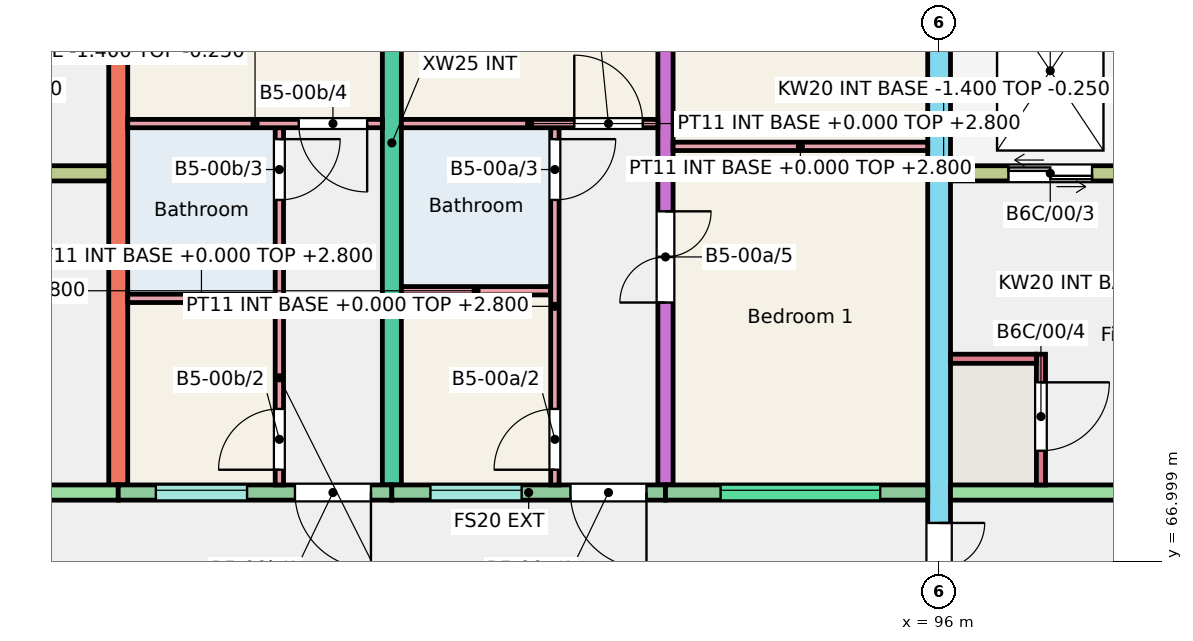
"""IFC4 building model, lengths in metres.
Left out: names, types, materials, properties, quantities, classifications, styles, units other than length and angle.
Written with IfcOpenShell. Run it as: python <this file> out.ifc"""

import sys

from ifc_helpers import new_model, si_unit, direction, frame, frame_2d, origin, place, context, subcontext, project, spatial, rectangle, extrude, element, fill, save


model = new_model("IFC4")
c1 = context("Model", 3, precision=1e-05, world=origin(), true_north=direction((0.0, 1.0)))
c2 = subcontext(c1, "Body", "Model", "MODEL_VIEW")
j1 = project(units=[si_unit("LENGTHUNIT", "METRE"), si_unit("PLANEANGLEUNIT", "RADIAN")], contexts=[c1])
p1 = place(None, origin())
s1 = spatial("IfcSite", under=j1, at=p1, CompositionType="ELEMENT")
p2 = place(p1, origin())
s2 = spatial("IfcBuilding", under=s1, at=p2, CompositionType="ELEMENT")
p3 = place(p2, origin())
s3 = spatial("IfcBuildingStorey", under=s2, at=p3, CompositionType="ELEMENT", Elevation=0.0)
for number, where, z_axis, x_axis in (
    (1, (85.2, 68.0, -0.25), (0.0, 0.0, 1.0), (0.0, 1.0, 0.0)),
    (2, (88.8, 68.0, -0.25), (0.0, 0.0, 1.0), (0.0, 1.0, 0.0)),
):
    element("IfcWall", number, at=place(p3, frame(where, z_axis=z_axis, x_axis=x_axis)), inside=s3, PredefinedType="SHEAR", context=c2, shape_type="SweptSolid", body=[
        extrude(rectangle(XDim=9.0, YDim=0.25, at=frame_2d((4.5, 0.0))), origin(), (0.0, 0.0, 1.0), 3.25),
    ])
p4 = place(p3, frame((92.4, 68.0, -0.25), z_axis=(0.0, 0.0, 1.0), x_axis=(0.0, 1.0, 0.0)))
e3 = element("IfcWall", 3, at=p4, inside=s3, PredefinedType="SHEAR", context=c2, shape_type="SweptSolid", body=[
    extrude(rectangle(XDim=9.0, YDim=0.2, at=frame_2d((4.5, 0.0))), origin(), (0.0, 0.0, 1.0), 3.25),
])
p5 = place(p4, frame((2.4, 0.0, 0.25)))
e4 = element("IfcOpeningElement", 4, at=p5, cuts=e3, PredefinedType="OPENING", context=c2, shape_type="SweptSolid", body=[
    extrude(rectangle(XDim=1.2, YDim=2.1, at=frame_2d((0.6, 1.05))), frame((0.0, 0.11, 0.0), z_axis=(0.0, -1.0, 0.0), x_axis=(1.0, 0.0, 0.0)), (0.0, 0.0, 1.0), 0.22),
])
p6 = place(p4, frame((6.4, 0.0, 0.25)))
e5 = element("IfcOpeningElement", 5, at=p6, cuts=e3, PredefinedType="OPENING", context=c2, shape_type="SweptSolid", body=[
    extrude(rectangle(XDim=1.2, YDim=2.1, at=frame_2d((0.6, 1.05))), frame((0.0, 0.11, 0.0), z_axis=(0.0, -1.0, 0.0), x_axis=(1.0, 0.0, 0.0)), (0.0, 0.0, 1.0), 0.22),
])
p7 = place(p3, frame((96.0, 66.0, -0.25), z_axis=(0.0, 0.0, 1.0), x_axis=(0.0, 1.0, 0.0)))
e6 = element("IfcWall", 6, at=p7, inside=s3, PredefinedType="SHEAR", context=c2, shape_type="SweptSolid", body=[
    extrude(rectangle(XDim=11.0, YDim=0.3, at=frame_2d((5.5, 0.0))), origin(), (0.0, 0.0, 1.0), 3.25),
])
p8 = place(p7, frame((0.3, 0.0, 0.25)))
e7 = element("IfcOpeningElement", 7, at=p8, cuts=e6, PredefinedType="OPENING", context=c2, shape_type="SweptSolid", body=[
    extrude(rectangle(XDim=1.2, YDim=2.1, at=frame_2d((0.6, 1.05))), frame((0.0, 0.16, 0.0), z_axis=(0.0, -1.0, 0.0), x_axis=(1.0, 0.0, 0.0)), (0.0, 0.0, 1.0), 0.32),
])
p9 = place(p3, frame((79.35, 67.9, -0.25), z_axis=(0.0, 0.0, 1.0), x_axis=(1.0, 0.0, 0.0)))
e8 = element("IfcWall", 8, at=p9, inside=s3, PredefinedType="SHEAR", context=c2, shape_type="SweptSolid", body=[
    extrude(rectangle(XDim=5.85, YDim=0.2, at=frame_2d((2.925, 0.0))), origin(), (0.0, 0.0, 1.0), 3.25),
])
p10 = place(p9, frame((2.312, 0.0, 0.25)))
e9 = element("IfcOpeningElement", 9, at=p10, cuts=e8, PredefinedType="OPENING", context=c2, shape_type="SweptSolid", body=[
    extrude(rectangle(XDim=1.1, YDim=2.1, at=frame_2d((0.55, 1.05))), frame((0.0, 0.11, 0.0), z_axis=(0.0, -1.0, 0.0), x_axis=(1.0, 0.0, 0.0)), (0.0, 0.0, 1.0), 0.22),
])
p11 = place(p3, frame((79.35, 72.1, -0.25), z_axis=(0.0, 0.0, 1.0), x_axis=(1.0, 0.0, 0.0)))
e10 = element("IfcWall", 10, at=p11, inside=s3, PredefinedType="SHEAR", context=c2, shape_type="SweptSolid", body=[
    extrude(rectangle(XDim=5.725, YDim=0.2, at=frame_2d((2.862, 0.0))), origin(), (0.0, 0.0, 1.0), 3.25),
])
p12 = place(p11, frame((3.775, 0.0, 0.25)))
e11 = element("IfcOpeningElement", 11, at=p12, cuts=e10, PredefinedType="OPENING", context=c2, shape_type="SweptSolid", body=[
    extrude(rectangle(XDim=1.0, YDim=2.1, at=frame_2d((0.5, 1.05))), frame((0.0, 0.11, 0.0), z_axis=(0.0, -1.0, 0.0), x_axis=(1.0, 0.0, 0.0)), (0.0, 0.0, 1.0), 0.22),
])
p13 = place(p11, frame((0.762, 0.0, 0.25)))
e12 = element("IfcOpeningElement", 12, at=p13, cuts=e10, PredefinedType="OPENING", context=c2, shape_type="SweptSolid", body=[
    extrude(rectangle(XDim=1.1, YDim=2.1, at=frame_2d((0.55, 1.05))), frame((0.0, 0.11, 0.0), z_axis=(0.0, -1.0, 0.0), x_axis=(1.0, 0.0, 0.0)), (0.0, 0.0, 1.0), 0.22),
])
p14 = place(p3, frame((85.2, 67.9, -0.25), z_axis=(0.0, 0.0, 1.0), x_axis=(1.0, 0.0, 0.0)))
e13 = element("IfcWall", 13, at=p14, inside=s3, PredefinedType="SOLIDWALL", context=c2, shape_type="SweptSolid", body=[
    extrude(rectangle(XDim=3.6, YDim=0.2, at=frame_2d((1.8, 0.0))), origin(), (0.0, 0.0, 1.0), 3.25),
])
p15 = place(p14, frame((0.495, 0.0, 1.35)))
e14 = element("IfcOpeningElement", 14, at=p15, cuts=e13, PredefinedType="OPENING", context=c2, shape_type="SweptSolid", body=[
    extrude(rectangle(XDim=1.2, YDim=1.3, at=frame_2d((0.6, 0.65))), frame((0.0, 0.11, 0.0), z_axis=(0.0, -1.0, 0.0), x_axis=(1.0, 0.0, 0.0)), (0.0, 0.0, 1.0), 0.22),
])
p16 = place(p14, frame((2.325, 0.0, 0.25)))
e15 = element("IfcOpeningElement", 15, at=p16, cuts=e13, PredefinedType="OPENING", context=c2, shape_type="SweptSolid", body=[
    extrude(rectangle(XDim=1.0, YDim=2.1, at=frame_2d((0.5, 1.05))), frame((0.0, 0.11, 0.0), z_axis=(0.0, -1.0, 0.0), x_axis=(1.0, 0.0, 0.0)), (0.0, 0.0, 1.0), 0.22),
])
p17 = place(p3, frame((88.8, 67.9, -0.25), z_axis=(0.0, 0.0, 1.0), x_axis=(1.0, 0.0, 0.0)))
e16 = element("IfcWall", 16, at=p17, inside=s3, PredefinedType="SOLIDWALL", context=c2, shape_type="SweptSolid", body=[
    extrude(rectangle(XDim=3.6, YDim=0.2, at=frame_2d((1.8, 0.0))), origin(), (0.0, 0.0, 1.0), 3.25),
])
p18 = place(p17, frame((0.508, 0.0, 1.35)))
e17 = element("IfcOpeningElement", 17, at=p18, cuts=e16, PredefinedType="OPENING", context=c2, shape_type="SweptSolid", body=[
    extrude(rectangle(XDim=1.2, YDim=1.3, at=frame_2d((0.6, 0.65))), frame((0.0, 0.11, 0.0), z_axis=(0.0, -1.0, 0.0), x_axis=(1.0, 0.0, 0.0)), (0.0, 0.0, 1.0), 0.22),
])
p19 = place(p17, frame((2.35, 0.0, 0.25)))
e18 = element("IfcOpeningElement", 18, at=p19, cuts=e16, PredefinedType="OPENING", context=c2, shape_type="SweptSolid", body=[
    extrude(rectangle(XDim=1.0, YDim=2.1, at=frame_2d((0.5, 1.05))), frame((0.0, 0.11, 0.0), z_axis=(0.0, -1.0, 0.0), x_axis=(1.0, 0.0, 0.0)), (0.0, 0.0, 1.0), 0.22),
])
p20 = place(p3, frame((92.4, 67.9, -0.25), z_axis=(0.0, 0.0, 1.0), x_axis=(1.0, 0.0, 0.0)))
e19 = element("IfcWall", 19, at=p20, inside=s3, PredefinedType="SOLIDWALL", context=c2, shape_type="SweptSolid", body=[
    extrude(rectangle(XDim=3.45, YDim=0.2, at=frame_2d((1.725, 0.0))), origin(), (0.0, 0.0, 1.0), 3.25),
])
p21 = place(p20, frame((0.725, 0.0, 1.45)))
e20 = element("IfcOpeningElement", 20, at=p21, cuts=e19, PredefinedType="OPENING", context=c2, shape_type="SweptSolid", body=[
    extrude(rectangle(XDim=2.1, YDim=1.2, at=frame_2d((1.05, 0.6))), frame((0.0, 0.11, 0.0), z_axis=(0.0, -1.0, 0.0), x_axis=(1.0, 0.0, 0.0)), (0.0, 0.0, 1.0), 0.22),
])
p22 = place(p3, frame((96.15, 67.9, -0.25), z_axis=(0.0, 0.0, 1.0), x_axis=(1.0, 0.0, 0.0)))
e21 = element("IfcWall", 21, at=p22, inside=s3, PredefinedType="SHEAR", context=c2, shape_type="SweptSolid", body=[
    extrude(rectangle(XDim=5.85, YDim=0.2, at=frame_2d((2.925, 0.0))), origin(), (0.0, 0.0, 1.0), 3.25),
])
p23 = place(p22, frame((2.312, 0.0, 0.25)))
e22 = element("IfcOpeningElement", 22, at=p23, cuts=e21, PredefinedType="OPENING", context=c2, shape_type="SweptSolid", body=[
    extrude(rectangle(XDim=1.1, YDim=2.1, at=frame_2d((0.55, 1.05))), frame((0.0, 0.11, 0.0), z_axis=(0.0, -1.0, 0.0), x_axis=(1.0, 0.0, 0.0)), (0.0, 0.0, 1.0), 0.22),
])
p24 = place(p3, frame((96.15, 72.1, -0.25), z_axis=(0.0, 0.0, 1.0), x_axis=(1.0, 0.0, 0.0)))
e23 = element("IfcWall", 23, at=p24, inside=s3, PredefinedType="SHEAR", context=c2, shape_type="SweptSolid", body=[
    extrude(rectangle(XDim=5.725, YDim=0.2, at=frame_2d((2.863, 0.0))), origin(), (0.0, 0.0, 1.0), 3.25),
])
p25 = place(p24, frame((3.775, 0.0, 0.25)))
e24 = element("IfcOpeningElement", 24, at=p25, cuts=e23, PredefinedType="OPENING", context=c2, shape_type="SweptSolid", body=[
    extrude(rectangle(XDim=1.0, YDim=2.1, at=frame_2d((0.5, 1.05))), frame((0.0, 0.11, 0.0), z_axis=(0.0, -1.0, 0.0), x_axis=(1.0, 0.0, 0.0)), (0.0, 0.0, 1.0), 0.22),
])
p26 = place(p24, frame((0.762, 0.0, 0.25)))
e25 = element("IfcOpeningElement", 25, at=p26, cuts=e23, PredefinedType="OPENING", context=c2, shape_type="SweptSolid", body=[
    extrude(rectangle(XDim=1.1, YDim=2.1, at=frame_2d((0.55, 1.05))), frame((0.0, 0.11, 0.0), z_axis=(0.0, -1.0, 0.0), x_axis=(1.0, 0.0, 0.0)), (0.0, 0.0, 1.0), 0.22),
])
p27 = place(p3, frame((97.34, 68.0, -0.25), z_axis=(0.0, 0.0, 1.0), x_axis=(0.0, 1.0, 0.0)))
e26 = element("IfcWall", 26, at=p27, inside=s3, PredefinedType="SHEAR", context=c2, shape_type="SweptSolid", body=[
    extrude(rectangle(XDim=1.72, YDim=0.12, at=frame_2d((0.86, 0.0))), origin(), (0.0, 0.0, 1.0), 3.25),
])
p28 = place(p27, frame((0.45, 0.0, 0.25)))
e27 = element("IfcOpeningElement", 27, at=p28, cuts=e26, PredefinedType="OPENING", context=c2, shape_type="SweptSolid", body=[
    extrude(rectangle(XDim=0.9, YDim=2.1, at=frame_2d((0.45, 1.05))), frame((0.0, 0.07, 0.0), z_axis=(0.0, -1.0, 0.0), x_axis=(1.0, 0.0, 0.0)), (0.0, 0.0, 1.0), 0.14),
])
p29 = place(p3, frame((96.15, 69.66, -0.25), z_axis=(0.0, 0.0, 1.0), x_axis=(1.0, 0.0, 0.0)))
e28 = element("IfcWall", 28, at=p29, inside=s3, PredefinedType="SHEAR", context=c2, shape_type="SweptSolid", body=[
    extrude(rectangle(XDim=1.13, YDim=0.12, at=frame_2d((0.565, 0.0))), origin(), (0.0, 0.0, 1.0), 3.25),
])
p30 = place(p3, frame((96.0, 72.1, -1.4), z_axis=(0.0, 0.0, 1.0), x_axis=(1.0, 0.0, 0.0)))
e29 = element("IfcWall", 29, at=p30, inside=s3, PredefinedType="SHEAR", context=c2, shape_type="SweptSolid", body=[
    extrude(rectangle(XDim=2.975, YDim=0.2, at=frame_2d((1.488, 0.0))), origin(), (0.0, 0.0, 1.0), 1.15),
])
p31 = place(p3, frame((96.075, 72.2, -1.4), z_axis=(0.0, 0.0, 1.0), x_axis=(0.0, 1.0, 0.0)))
e30 = element("IfcWall", 30, at=p31, inside=s3, PredefinedType="SHEAR", context=c2, shape_type="SweptSolid", body=[
    extrude(rectangle(XDim=3.0, YDim=0.15, at=frame_2d((1.5, 0.0))), origin(), (0.0, 0.0, 1.0), 1.15),
])
p32 = place(p3, frame((88.925, 70.555, 0.0), z_axis=(0.0, 0.0, 1.0), x_axis=(1.0, 0.0, 0.0)))
e31 = element("IfcWall", 31, at=p32, inside=s3, PredefinedType="PARTITIONING", context=c2, shape_type="SweptSolid", body=[
    extrude(rectangle(XDim=1.965, YDim=0.11, at=frame_2d((0.982, 0.0))), origin(), (0.0, 0.0, 1.0), 2.8),
])
p33 = place(p3, frame((90.945, 68.0, 0.0), z_axis=(0.0, 0.0, 1.0), x_axis=(0.0, 1.0, 0.0)))
e32 = element("IfcWall", 32, at=p33, inside=s3, PredefinedType="PARTITIONING", context=c2, shape_type="SweptSolid", body=[
    extrude(rectangle(XDim=4.7, YDim=0.11, at=frame_2d((2.35, 0.0))), origin(), (0.0, 0.0, 1.0), 2.8),
])
p34 = place(p33, frame((0.2, 0.0, 0.0)))
e33 = element("IfcOpeningElement", 33, at=p34, cuts=e32, PredefinedType="OPENING", context=c2, shape_type="SweptSolid", body=[
    extrude(rectangle(XDim=0.8, YDim=2.1, at=frame_2d((0.4, 1.05))), frame((0.0, 0.065, 0.0), z_axis=(0.0, -1.0, 0.0), x_axis=(1.0, 0.0, 0.0)), (0.0, 0.0, 1.0), 0.13),
])
p35 = place(p33, frame((3.75, 0.0, 0.0)))
e34 = element("IfcOpeningElement", 34, at=p35, cuts=e32, PredefinedType="OPENING", context=c2, shape_type="SweptSolid", body=[
    extrude(rectangle(XDim=0.8, YDim=2.1, at=frame_2d((0.4, 1.05))), frame((0.0, 0.065, 0.0), z_axis=(0.0, -1.0, 0.0), x_axis=(1.0, 0.0, 0.0)), (0.0, 0.0, 1.0), 0.13),
])
p36 = place(p3, frame((88.925, 72.755, 0.0), z_axis=(0.0, 0.0, 1.0), x_axis=(1.0, 0.0, 0.0)))
e35 = element("IfcWall", 35, at=p36, inside=s3, PredefinedType="PARTITIONING", context=c2, shape_type="SweptSolid", body=[
    extrude(rectangle(XDim=3.375, YDim=0.11, at=frame_2d((1.688, 0.0))), origin(), (0.0, 0.0, 1.0), 2.8),
])
p37 = place(p36, frame((2.275, 0.0, 0.0)))
e36 = element("IfcOpeningElement", 36, at=p37, cuts=e35, PredefinedType="OPENING", context=c2, shape_type="SweptSolid", body=[
    extrude(rectangle(XDim=0.9, YDim=2.1, at=frame_2d((0.45, 1.05))), frame((0.0, 0.065, 0.0), z_axis=(0.0, -1.0, 0.0), x_axis=(1.0, 0.0, 0.0)), (0.0, 0.0, 1.0), 0.13),
])
p38 = place(p3, frame((92.5, 72.455, 0.0), z_axis=(0.0, 0.0, 1.0), x_axis=(1.0, 0.0, 0.0)))
e37 = element("IfcWall", 37, at=p38, inside=s3, PredefinedType="PARTITIONING", context=c2, shape_type="SweptSolid", body=[
    extrude(rectangle(XDim=3.35, YDim=0.11, at=frame_2d((1.675, 0.0))), origin(), (0.0, 0.0, 1.0), 2.8),
])
p39 = place(p3, frame((85.325, 70.455, 0.0), z_axis=(0.0, 0.0, 1.0), x_axis=(1.0, 0.0, 0.0)))
e38 = element("IfcWall", 38, at=p39, inside=s3, PredefinedType="PARTITIONING", context=c2, shape_type="SweptSolid", body=[
    extrude(rectangle(XDim=1.94, YDim=0.11, at=frame_2d((0.97, 0.0))), origin(), (0.0, 0.0, 1.0), 2.8),
])
p40 = place(p3, frame((87.32, 68.0, 0.0), z_axis=(0.0, 0.0, 1.0), x_axis=(0.0, 1.0, 0.0)))
e39 = element("IfcWall", 39, at=p40, inside=s3, PredefinedType="PARTITIONING", context=c2, shape_type="SweptSolid", body=[
    extrude(rectangle(XDim=4.7, YDim=0.11, at=frame_2d((2.35, 0.0))), origin(), (0.0, 0.0, 1.0), 2.8),
])
p41 = place(p40, frame((0.2, 0.0, 0.0)))
e40 = element("IfcOpeningElement", 40, at=p41, cuts=e39, PredefinedType="OPENING", context=c2, shape_type="SweptSolid", body=[
    extrude(rectangle(XDim=0.8, YDim=2.1, at=frame_2d((0.4, 1.05))), frame((0.0, 0.065, 0.0), z_axis=(0.0, -1.0, 0.0), x_axis=(1.0, 0.0, 0.0)), (0.0, 0.0, 1.0), 0.13),
])
p42 = place(p40, frame((3.75, 0.0, 0.0)))
e41 = element("IfcOpeningElement", 41, at=p42, cuts=e39, PredefinedType="OPENING", context=c2, shape_type="SweptSolid", body=[
    extrude(rectangle(XDim=0.8, YDim=2.1, at=frame_2d((0.4, 1.05))), frame((0.0, 0.065, 0.0), z_axis=(0.0, -1.0, 0.0), x_axis=(1.0, 0.0, 0.0)), (0.0, 0.0, 1.0), 0.13),
])
p43 = place(p3, frame((85.325, 72.755, 0.0), z_axis=(0.0, 0.0, 1.0), x_axis=(1.0, 0.0, 0.0)))
e42 = element("IfcWall", 42, at=p43, inside=s3, PredefinedType="PARTITIONING", context=c2, shape_type="SweptSolid", body=[
    extrude(rectangle(XDim=3.35, YDim=0.11, at=frame_2d((1.675, 0.0))), origin(), (0.0, 0.0, 1.0), 2.8),
])
p44 = place(p43, frame((2.25, 0.0, 0.0)))
e43 = element("IfcOpeningElement", 43, at=p44, cuts=e42, PredefinedType="OPENING", context=c2, shape_type="SweptSolid", body=[
    extrude(rectangle(XDim=0.9, YDim=2.1, at=frame_2d((0.45, 1.05))), frame((0.0, 0.065, 0.0), z_axis=(0.0, -1.0, 0.0), x_axis=(1.0, 0.0, 0.0)), (0.0, 0.0, 1.0), 0.13),
])
p45 = place(p21, origin())
e44 = element("IfcWindow", 44, at=p45, inside=s3, PartitioningType="SINGLE_PANEL", PredefinedType="WINDOW", context=c2, shape_type="SweptSolid", body=[
    extrude(rectangle(XDim=2.1, YDim=1.2, at=frame_2d((1.05, 0.6))), frame((0.0, 0.06, 0.0), z_axis=(0.0, -1.0, 0.0), x_axis=(1.0, 0.0, 0.0)), (0.0, 0.0, 1.0), 0.06),
])
fill(e20, e44)
p46 = place(p18, origin())
e45 = element("IfcWindow", 45, at=p46, inside=s3, PartitioningType="SINGLE_PANEL", PredefinedType="WINDOW", context=c2, shape_type="SweptSolid", body=[
    extrude(rectangle(XDim=1.2, YDim=1.3, at=frame_2d((0.6, 0.65))), frame((0.0, 0.06, 0.0), z_axis=(0.0, -1.0, 0.0), x_axis=(1.0, 0.0, 0.0)), (0.0, 0.0, 1.0), 0.06),
])
fill(e17, e45)
p47 = place(p15, origin())
e46 = element("IfcWindow", 46, at=p47, inside=s3, PartitioningType="SINGLE_PANEL", PredefinedType="WINDOW", context=c2, shape_type="SweptSolid", body=[
    extrude(rectangle(XDim=1.2, YDim=1.3, at=frame_2d((0.6, 0.65))), frame((0.0, 0.06, 0.0), z_axis=(0.0, -1.0, 0.0), x_axis=(1.0, 0.0, 0.0)), (0.0, 0.0, 1.0), 0.06),
])
fill(e14, e46)
p48 = place(p19, origin())
e47 = element("IfcDoor", 47, at=p48, inside=s3, OperationType="SINGLE_SWING_RIGHT", PredefinedType="DOOR", context=c2, shape_type="SweptSolid", body=[
    extrude(rectangle(XDim=1.0, YDim=2.1, at=frame_2d((0.5, 1.05))), frame((0.0, 0.025, 0.0), z_axis=(0.0, -1.0, 0.0), x_axis=(1.0, 0.0, 0.0)), (0.0, 0.0, 1.0), 0.05),
])
fill(e18, e47)
p49 = place(p34, origin())
e48 = element("IfcDoor", 48, at=p49, inside=s3, OperationType="SINGLE_SWING_LEFT", PredefinedType="DOOR", context=c2, shape_type="SweptSolid", body=[
    extrude(rectangle(XDim=0.8, YDim=2.1, at=frame_2d((0.4, 1.05))), frame((0.0, 0.025, 0.0), z_axis=(0.0, -1.0, 0.0), x_axis=(1.0, 0.0, 0.0)), (0.0, 0.0, 1.0), 0.05),
])
fill(e33, e48)
p50 = place(p35, origin())
e49 = element("IfcDoor", 49, at=p50, inside=s3, OperationType="SINGLE_SWING_RIGHT", PredefinedType="DOOR", context=c2, shape_type="SweptSolid", body=[
    extrude(rectangle(XDim=0.8, YDim=2.1, at=frame_2d((0.4, 1.05))), frame((0.0, 0.025, 0.0), z_axis=(0.0, -1.0, 0.0), x_axis=(1.0, 0.0, 0.0)), (0.0, 0.0, 1.0), 0.05),
])
fill(e34, e49)
p51 = place(p37, origin())
e50 = element("IfcDoor", 50, at=p51, inside=s3, OperationType="SINGLE_SWING_LEFT", PredefinedType="DOOR", context=c2, shape_type="SweptSolid", body=[
    extrude(rectangle(XDim=0.9, YDim=2.1, at=frame_2d((0.45, 1.05))), frame((0.0, 0.025, 0.0), z_axis=(0.0, -1.0, 0.0), x_axis=(1.0, 0.0, 0.0)), (0.0, 0.0, 1.0), 0.05),
])
fill(e36, e50)
p52 = place(p5, origin())
e51 = element("IfcDoor", 51, at=p52, inside=s3, OperationType="DOUBLE_DOOR_SINGLE_SWING", PredefinedType="DOOR", context=c2, shape_type="SweptSolid", body=[
    extrude(rectangle(XDim=1.2, YDim=2.1, at=frame_2d((0.6, 1.05))), frame((0.0, 0.025, 0.0), z_axis=(0.0, -1.0, 0.0), x_axis=(1.0, 0.0, 0.0)), (0.0, 0.0, 1.0), 0.05),
])
fill(e4, e51)
p53 = place(p16, origin())
e52 = element("IfcDoor", 52, at=p53, inside=s3, OperationType="SINGLE_SWING_RIGHT", PredefinedType="DOOR", context=c2, shape_type="SweptSolid", body=[
    extrude(rectangle(XDim=1.0, YDim=2.1, at=frame_2d((0.5, 1.05))), frame((0.0, 0.025, 0.0), z_axis=(0.0, -1.0, 0.0), x_axis=(1.0, 0.0, 0.0)), (0.0, 0.0, 1.0), 0.05),
])
fill(e15, e52)
p54 = place(p41, origin())
e53 = element("IfcDoor", 53, at=p54, inside=s3, OperationType="SINGLE_SWING_LEFT", PredefinedType="DOOR", context=c2, shape_type="SweptSolid", body=[
    extrude(rectangle(XDim=0.8, YDim=2.1, at=frame_2d((0.4, 1.05))), frame((0.0, 0.025, 0.0), z_axis=(0.0, -1.0, 0.0), x_axis=(1.0, 0.0, 0.0)), (0.0, 0.0, 1.0), 0.05),
])
fill(e40, e53)
p55 = place(p42, origin())
e54 = element("IfcDoor", 54, at=p55, inside=s3, OperationType="SINGLE_SWING_RIGHT", PredefinedType="DOOR", context=c2, shape_type="SweptSolid", body=[
    extrude(rectangle(XDim=0.8, YDim=2.1, at=frame_2d((0.4, 1.05))), frame((0.0, 0.025, 0.0), z_axis=(0.0, -1.0, 0.0), x_axis=(1.0, 0.0, 0.0)), (0.0, 0.0, 1.0), 0.05),
])
fill(e41, e54)
p56 = place(p44, origin())
e55 = element("IfcDoor", 55, at=p56, inside=s3, OperationType="SINGLE_SWING_RIGHT", PredefinedType="DOOR", context=c2, shape_type="SweptSolid", body=[
    extrude(rectangle(XDim=0.9, YDim=2.1, at=frame_2d((0.45, 1.05))), frame((0.0, 0.025, 0.0), z_axis=(0.0, -1.0, 0.0), x_axis=(1.0, 0.0, 0.0)), (0.0, 0.0, 1.0), 0.05),
])
fill(e43, e55)
p57 = place(p26, origin())
e56 = element("IfcDoor", 56, at=p57, inside=s3, OperationType="DOUBLE_DOOR_SLIDING", PredefinedType="DOOR", context=c2, shape_type="SweptSolid", body=[
    extrude(rectangle(XDim=1.1, YDim=2.1, at=frame_2d((0.55, 1.05))), frame((0.0, 0.025, 0.0), z_axis=(0.0, -1.0, 0.0), x_axis=(1.0, 0.0, 0.0)), (0.0, 0.0, 1.0), 0.05),
])
fill(e25, e56)
p58 = place(p28, origin())
e57 = element("IfcDoor", 57, at=p58, inside=s3, OperationType="SINGLE_SWING_RIGHT", PredefinedType="DOOR", context=c2, shape_type="SweptSolid", body=[
    extrude(rectangle(XDim=0.9, YDim=2.1, at=frame_2d((0.45, 1.05))), frame((0.0, 0.025, 0.0), z_axis=(0.0, -1.0, 0.0), x_axis=(1.0, 0.0, 0.0)), (0.0, 0.0, 1.0), 0.05),
])
fill(e27, e57)
p59 = place(p8, origin())
e58 = element("IfcDoor", 58, at=p59, inside=s3, OperationType="DOUBLE_DOOR_SINGLE_SWING", PredefinedType="DOOR", context=c2, shape_type="SweptSolid", body=[
    extrude(rectangle(XDim=1.2, YDim=2.1, at=frame_2d((0.6, 1.05))), frame((0.0, 0.025, 0.0), z_axis=(0.0, -1.0, 0.0), x_axis=(1.0, 0.0, 0.0)), (0.0, 0.0, 1.0), 0.05),
])
fill(e7, e58)
save(model, sys.argv[1])
